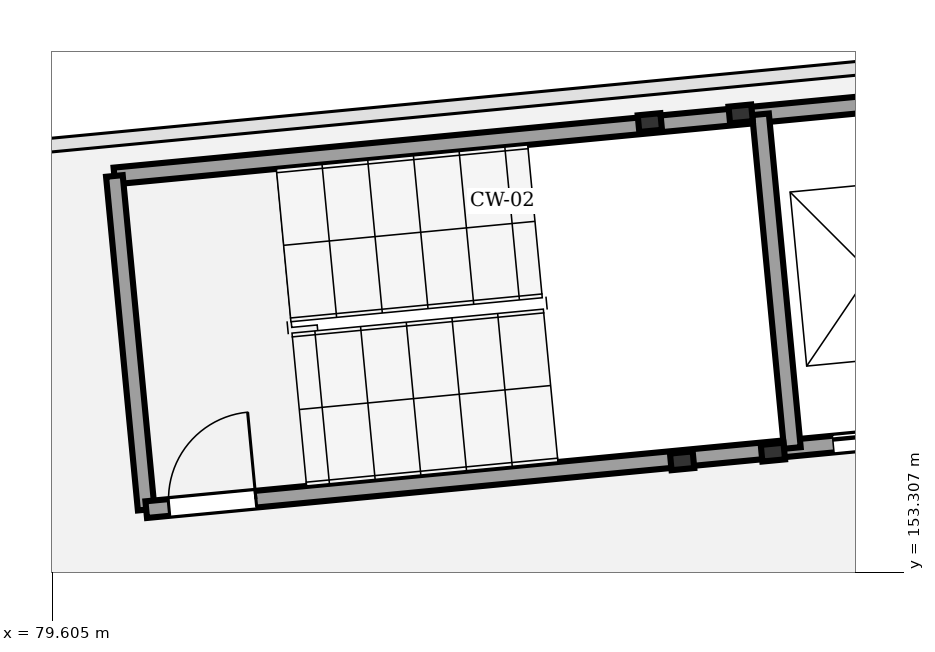
"""IFC4 building model, lengths in metres.
Left out: names, types, materials, properties, quantities, classifications, styles, units other than length and angle.
Written with IfcOpenShell. Run it as: python <this file> out.ifc"""

import sys

from ifc_helpers import new_model, si_unit, direction, frame, frame_2d, origin, origin_2d, place, context, subcontext, project, spatial, rectangle, extrude, element, fill, save


model = new_model("IFC4")
c1 = context("Model", 3, precision=1e-05, world=origin(), true_north=direction((0.0, 1.0)))
c2 = subcontext(c1, "Body", "Model", "MODEL_VIEW")
j1 = project(units=[si_unit("LENGTHUNIT", "METRE"), si_unit("PLANEANGLEUNIT", "RADIAN")], contexts=[c1])
p1 = place(None, origin())
s1 = spatial("IfcSite", under=j1, at=p1, CompositionType="ELEMENT")
p2 = place(p1, origin())
s2 = spatial("IfcBuilding", under=s1, at=p2, CompositionType="ELEMENT")
p3 = place(p2, frame((0.0, 0.0, 10.2)))
s3 = spatial("IfcBuildingStorey", under=s2, at=p3, CompositionType="ELEMENT", Elevation=10.2)
for number, where, z_axis, x_axis in (
    (1, (87.894, 154.773, 0.0), (0.0, 0.0, 1.0), (0.995, 0.095, 0.0)),
    (2, (89.088, 154.887, 0.0), (0.0, 0.0, 1.0), (0.995, 0.095, 0.0)),
    (3, (88.664, 159.337, 0.0), (0.0, 0.0, 1.0), (0.995, 0.095, 0.0)),
    (4, (87.469, 159.223, 0.0), (0.0, 0.0, 1.0), (0.995, 0.095, 0.0)),
):
    element("IfcColumn", number, at=place(p3, frame(where, z_axis=z_axis, x_axis=x_axis)), inside=s3, PredefinedType="COLUMN", context=c2, shape_type="SweptSolid", body=[
        extrude(rectangle(XDim=0.3, YDim=0.22, at=origin_2d()), origin(), (0.0, 0.0, 1.0), 4.5),
    ])
p4 = place(p3, frame((80.424, 158.521, 0.0), z_axis=(0.0, 0.0, 1.0), x_axis=(0.99547962713, 0.094975322952, 0.0)))
e5 = element("IfcWall", 5, at=p4, inside=s3, PredefinedType="SHEAR", context=c2, shape_type="SweptSolid", body=[
    extrude(rectangle(XDim=11.02, YDim=0.22, at=frame_2d((5.51, 0.0))), origin(), (0.0, 0.0, 1.0), 4.25),
])
p5 = place(p3, frame((80.843, 154.13, 0.0), z_axis=(0.0, 0.0, 1.0), x_axis=(-0.094997189401, 0.995477540684, 0.0)))
e6 = element("IfcWall", 6, at=p5, inside=s3, PredefinedType="SHEAR", context=c2, shape_type="SweptSolid", body=[
    extrude(rectangle(XDim=4.41, YDim=0.22, at=frame_2d((2.205, 0.0))), origin(), (0.0, 0.0, 1.0), 4.25),
])
p6 = place(p3, frame((80.843, 154.13, 0.0), z_axis=(0.0, 0.0, 1.0), x_axis=(0.995479427285, 0.094977417594, 0.0)))
e7 = element("IfcWall", 7, at=p6, inside=s3, PredefinedType="SHEAR", context=c2, shape_type="SweptSolid", body=[
    extrude(rectangle(XDim=11.02, YDim=0.22, at=frame_2d((5.51, 0.0))), origin(), (0.0, 0.0, 1.0), 4.25),
])
p7 = place(p6, frame((0.3, 0.0, 0.0)))
e8 = element("IfcOpeningElement", 8, at=p7, cuts=e7, PredefinedType="OPENING", context=c2, shape_type="SweptSolid", body=[
    extrude(rectangle(XDim=1.15, YDim=2.15, at=frame_2d((0.575, 1.075))), frame((0.0, 0.12, 0.0), z_axis=(0.0, -1.0, 0.0), x_axis=(1.0, 0.0, 0.0)), (0.0, 0.0, 1.0), 0.24),
])
p8 = place(p6, frame((9.08, 0.0, 0.0)))
e9 = element("IfcOpeningElement", 9, at=p8, cuts=e7, PredefinedType="OPENING", context=c2, shape_type="SweptSolid", body=[
    extrude(rectangle(XDim=1.4, YDim=2.25, at=frame_2d((0.7, 1.125))), frame((0.0, 0.12, 0.0), z_axis=(0.0, -1.0, 0.0), x_axis=(1.0, 0.0, 0.0)), (0.0, 0.0, 1.0), 0.24),
])
p9 = place(p3, frame((89.344, 154.941, 0.0), z_axis=(0.0, 0.0, 1.0), x_axis=(-0.094942328893, 0.995482774429, 0.0)))
e10 = element("IfcWall", 10, at=p9, inside=s3, PredefinedType="SHEAR", context=c2, shape_type="SweptSolid", body=[
    extrude(rectangle(XDim=4.41, YDim=0.22, at=frame_2d((2.205, 0.0))), origin(), (0.0, 0.0, 1.0), 4.25),
])
p10 = place(p7, origin())
e11 = element("IfcDoor", 11, at=p10, inside=s3, OperationType="SINGLE_SWING_RIGHT", PredefinedType="DOOR", context=c2, shape_type="SweptSolid", body=[
    extrude(rectangle(XDim=1.15, YDim=2.15, at=frame_2d((0.575, 1.075))), frame((0.0, 0.025, 0.0), z_axis=(0.0, -1.0, 0.0), x_axis=(1.0, 0.0, 0.0)), (0.0, 0.0, 1.0), 0.05),
])
fill(e8, e11)
p11 = place(p8, origin())
e12 = element("IfcDoor", 12, at=p11, inside=s3, OperationType="DOUBLE_DOOR_SLIDING", PredefinedType="DOOR", context=c2, shape_type="SweptSolid", body=[
    extrude(rectangle(XDim=1.4, YDim=2.25, at=frame_2d((0.7, 1.125))), frame((0.0, 0.025, 0.0), z_axis=(0.0, -1.0, 0.0), x_axis=(1.0, 0.0, 0.0)), (0.0, 0.0, 1.0), 0.05),
])
fill(e9, e12)
save(model, sys.argv[1])
